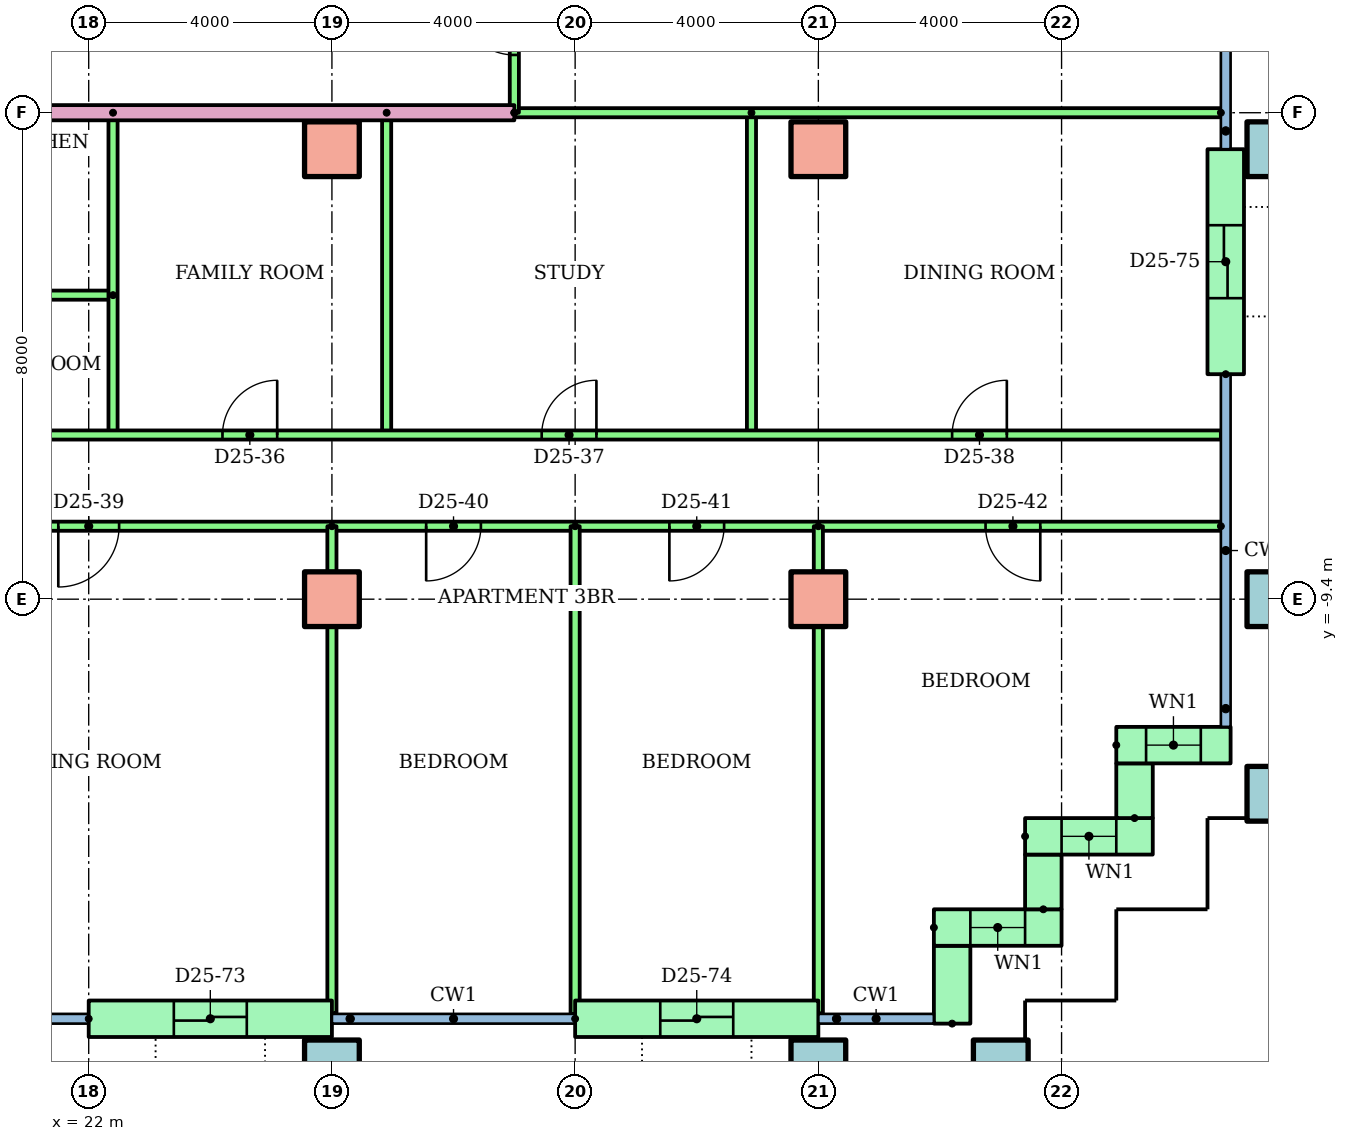
"""IFC4 building model, lengths in metres.
Left out: names, types, materials, properties, quantities, classifications, styles, units other than length and angle.
Written with IfcOpenShell. Run it as: python <this file> out.ifc"""

import sys

from ifc_helpers import new_model, si_unit, direction, frame, frame_2d, origin, origin_2d, place, context, subcontext, project, spatial, rectangle, hollow_rectangle, extrude, element, fill, save


model = new_model("IFC4")
c1 = context("Model", 3, precision=1e-05, world=origin(), true_north=direction((0.0, 1.0)))
c2 = subcontext(c1, "Body", "Model", "MODEL_VIEW")
j1 = project(units=[si_unit("LENGTHUNIT", "METRE"), si_unit("PLANEANGLEUNIT", "RADIAN")], contexts=[c1])
p1 = place(None, origin())
s1 = spatial("IfcSite", under=j1, at=p1, CompositionType="ELEMENT")
p2 = place(p1, origin())
s2 = spatial("IfcBuilding", under=s1, at=p2, CompositionType="ELEMENT")
p3 = place(p2, frame((0.0, 0.0, 96.7)))
s3 = spatial("IfcBuildingStorey", under=s2, at=p3, CompositionType="ELEMENT", Elevation=96.7)
for number, where in (
    (1, (26.0, -17.1, 0.0)),
    (2, (34.0, -17.1, 0.0)),
    (3, (37.0, -17.1, 0.0)),
    (4, (41.5, -12.6, 0.0)),
):
    element("IfcColumn", number, at=place(p3, frame(where)), inside=s3, PredefinedType="COLUMN", context=c2, shape_type="SweptSolid", body=[
        extrude(hollow_rectangle(XDim=0.9, YDim=0.9, WallThickness=0.045, at=origin_2d()), origin(), (0.0, 0.0, 1.0), 3.2),
    ])
for number, where in (
    (5, (26.0, -9.4, 0.0)),
    (6, (34.0, -9.4, 0.0)),
):
    element("IfcColumn", number, at=place(p3, frame(where)), inside=s3, PredefinedType="COLUMN", context=c2, shape_type="SweptSolid", body=[
        extrude(rectangle(XDim=0.9, YDim=0.9, at=origin_2d()), origin(), (0.0, 0.0, 1.0), 3.2),
    ])
p4 = place(p3, frame((41.5, -9.4, 0.0)))
e7 = element("IfcColumn", 7, at=p4, inside=s3, PredefinedType="COLUMN", context=c2, shape_type="SweptSolid", body=[
    extrude(hollow_rectangle(XDim=0.9, YDim=0.9, WallThickness=0.045, at=origin_2d()), origin(), (0.0, 0.0, 1.0), 3.2),
])
for number, where in (
    (8, (26.0, -2.0, 0.0)),
    (9, (34.0, -2.0, 0.0)),
):
    element("IfcColumn", number, at=place(p3, frame(where)), inside=s3, PredefinedType="COLUMN", context=c2, shape_type="SweptSolid", body=[
        extrude(rectangle(XDim=0.9, YDim=0.9, at=origin_2d()), origin(), (0.0, 0.0, 1.0), 3.2),
    ])
p5 = place(p3, frame((41.5, -2.0, 0.0)))
e10 = element("IfcColumn", 10, at=p5, inside=s3, PredefinedType="COLUMN", context=c2, shape_type="SweptSolid", body=[
    extrude(hollow_rectangle(XDim=0.9, YDim=0.9, WallThickness=0.045, at=origin_2d()), origin(), (0.0, 0.0, 1.0), 3.2),
])
p6 = place(p3, frame((22.0, -16.3, 0.0)))
e11 = element("IfcWall", 11, at=p6, inside=s3, PredefinedType="STANDARD", context=c2, shape_type="SweptSolid", body=[
    extrude(rectangle(XDim=4.0, YDim=0.6, at=frame_2d((2.0, 0.0))), origin(), (0.0, 0.0, 1.0), 2.92),
])
p7 = place(p6, frame((1.4, 0.0, 0.0)))
e12 = element("IfcOpeningElement", 12, at=p7, cuts=e11, PredefinedType="OPENING", context=c2, shape_type="SweptSolid", body=[
    extrude(rectangle(XDim=1.2, YDim=2.1, at=frame_2d((0.6, 1.05))), frame((0.0, 0.31, 0.0), z_axis=(0.0, -1.0, 0.0), x_axis=(1.0, 0.0, 0.0)), (0.0, 0.0, 1.0), 0.62),
])
p8 = place(p3, frame((30.0, -16.3, 0.0)))
e13 = element("IfcWall", 13, at=p8, inside=s3, PredefinedType="STANDARD", context=c2, shape_type="SweptSolid", body=[
    extrude(rectangle(XDim=4.0, YDim=0.6, at=frame_2d((2.0, 0.0))), origin(), (0.0, 0.0, 1.0), 2.92),
])
p9 = place(p8, frame((1.4, 0.0, 0.0)))
e14 = element("IfcOpeningElement", 14, at=p9, cuts=e13, PredefinedType="OPENING", context=c2, shape_type="SweptSolid", body=[
    extrude(rectangle(XDim=1.2, YDim=2.1, at=frame_2d((0.6, 1.05))), frame((0.0, 0.31, 0.0), z_axis=(0.0, -1.0, 0.0), x_axis=(1.0, 0.0, 0.0)), (0.0, 0.0, 1.0), 0.62),
])
p10 = place(p3, frame((36.2, -16.38, 0.0), z_axis=(0.0, 0.0, 1.0), x_axis=(0.0, 1.0, 0.0)))
e15 = element("IfcWall", 15, at=p10, inside=s3, PredefinedType="STANDARD", context=c2, shape_type="SweptSolid", body=[
    extrude(rectangle(XDim=1.28, YDim=0.6, at=frame_2d((0.64, 0.0))), origin(), (0.0, 0.0, 1.0), 2.92),
])
p11 = place(p3, frame((35.9, -14.8, 0.0)))
e16 = element("IfcWall", 16, at=p11, inside=s3, PredefinedType="STANDARD", context=c2, shape_type="SweptSolid", body=[
    extrude(rectangle(XDim=2.1, YDim=0.6, at=frame_2d((1.05, 0.0))), origin(), (0.0, 0.0, 1.0), 2.92),
])
p12 = place(p11, frame((0.6, 0.0, 0.9)))
e17 = element("IfcOpeningElement", 17, at=p12, cuts=e16, PredefinedType="OPENING", context=c2, shape_type="SweptSolid", body=[
    extrude(rectangle(XDim=0.9, YDim=1.5, at=frame_2d((0.45, 0.75))), frame((0.0, 0.31, 0.0), z_axis=(0.0, -1.0, 0.0), x_axis=(1.0, 0.0, 0.0)), (0.0, 0.0, 1.0), 0.62),
])
p13 = place(p3, frame((37.7, -14.5, 0.0), z_axis=(0.0, 0.0, 1.0), x_axis=(0.0, 1.0, 0.0)))
e18 = element("IfcWall", 18, at=p13, inside=s3, PredefinedType="STANDARD", context=c2, shape_type="SweptSolid", body=[
    extrude(rectangle(XDim=0.9, YDim=0.6, at=frame_2d((0.45, 0.0))), origin(), (0.0, 0.0, 1.0), 2.92),
])
p14 = place(p3, frame((37.4, -13.3, 0.0)))
e19 = element("IfcWall", 19, at=p14, inside=s3, PredefinedType="STANDARD", context=c2, shape_type="SweptSolid", body=[
    extrude(rectangle(XDim=2.1, YDim=0.6, at=frame_2d((1.05, 0.0))), origin(), (0.0, 0.0, 1.0), 2.92),
])
p15 = place(p14, frame((0.6, 0.0, 0.9)))
e20 = element("IfcOpeningElement", 20, at=p15, cuts=e19, PredefinedType="OPENING", context=c2, shape_type="SweptSolid", body=[
    extrude(rectangle(XDim=0.9, YDim=1.5, at=frame_2d((0.45, 0.75))), frame((0.0, 0.31, 0.0), z_axis=(0.0, -1.0, 0.0), x_axis=(1.0, 0.0, 0.0)), (0.0, 0.0, 1.0), 0.62),
])
p16 = place(p3, frame((39.2, -13.0, 0.0), z_axis=(0.0, 0.0, 1.0), x_axis=(0.0, 1.0, 0.0)))
e21 = element("IfcWall", 21, at=p16, inside=s3, PredefinedType="STANDARD", context=c2, shape_type="SweptSolid", body=[
    extrude(rectangle(XDim=0.9, YDim=0.6, at=frame_2d((0.45, 0.0))), origin(), (0.0, 0.0, 1.0), 2.92),
])
p17 = place(p3, frame((38.9, -11.8, 0.0)))
e22 = element("IfcWall", 22, at=p17, inside=s3, PredefinedType="STANDARD", context=c2, shape_type="SweptSolid", body=[
    extrude(rectangle(XDim=1.88, YDim=0.6, at=frame_2d((0.94, 0.0))), origin(), (0.0, 0.0, 1.0), 2.92),
])
p18 = place(p17, frame((0.49, 0.0, 0.9)))
e23 = element("IfcOpeningElement", 23, at=p18, cuts=e22, PredefinedType="OPENING", context=c2, shape_type="SweptSolid", body=[
    extrude(rectangle(XDim=0.9, YDim=1.5, at=frame_2d((0.45, 0.75))), frame((0.0, 0.31, 0.0), z_axis=(0.0, -1.0, 0.0), x_axis=(1.0, 0.0, 0.0)), (0.0, 0.0, 1.0), 0.62),
])
p19 = place(p3, frame((40.7, -5.7, 0.0), z_axis=(0.0, 0.0, 1.0), x_axis=(0.0, 1.0, 0.0)))
e24 = element("IfcWall", 24, at=p19, inside=s3, PredefinedType="STANDARD", context=c2, shape_type="SweptSolid", body=[
    extrude(rectangle(XDim=3.7, YDim=0.6, at=frame_2d((1.85, 0.0))), origin(), (0.0, 0.0, 1.0), 2.92),
])
p20 = place(p19, frame((1.25, 0.0, 0.0)))
e25 = element("IfcOpeningElement", 25, at=p20, cuts=e24, PredefinedType="OPENING", context=c2, shape_type="SweptSolid", body=[
    extrude(rectangle(XDim=1.2, YDim=2.1, at=frame_2d((0.6, 1.05))), frame((0.0, 0.31, 0.0), z_axis=(0.0, -1.0, 0.0), x_axis=(1.0, 0.0, 0.0)), (0.0, 0.0, 1.0), 0.62),
])
p21 = place(p3, frame((22.4, -4.4, 0.0), z_axis=(0.0, 0.0, 1.0), x_axis=(-1.0, 0.0, 0.0)))
e26 = element("IfcWall", 26, at=p21, inside=s3, PredefinedType="PARTITIONING", context=c2, shape_type="SweptSolid", body=[
    extrude(rectangle(XDim=2.4, YDim=0.15, at=frame_2d((1.2, 0.0))), origin(), (0.0, 0.0, 1.0), 2.4),
])
for number, where, z_axis, x_axis in (
    (27, (22.4, -1.4, 0.0), (0.0, 0.0, 1.0), (0.0, -1.0, 0.0)),
    (28, (26.9, -1.4, 0.0), (0.0, 0.0, 1.0), (0.0, -1.0, 0.0)),
    (29, (32.9, -1.4, 0.0), (0.0, 0.0, 1.0), (0.0, -1.0, 0.0)),
):
    element("IfcWall", number, at=place(p3, frame(where, z_axis=z_axis, x_axis=x_axis)), inside=s3, PredefinedType="PARTITIONING", context=c2, shape_type="SweptSolid", body=[
        extrude(rectangle(XDim=5.3, YDim=0.15, at=frame_2d((2.65, 0.0))), origin(), (0.0, 0.0, 1.0), 2.4),
    ])
p22 = place(p3, frame((20.0, -6.7, 0.0)))
e30 = element("IfcWall", 30, at=p22, inside=s3, PredefinedType="PARTITIONING", context=c2, shape_type="SweptSolid", body=[
    extrude(rectangle(XDim=20.62, YDim=0.15, at=frame_2d((10.31, 0.0))), origin(), (0.0, 0.0, 1.0), 2.4),
])
p23 = place(p22, frame((4.2, 0.0, 0.0)))
e31 = element("IfcOpeningElement", 31, at=p23, cuts=e30, PredefinedType="OPENING", context=c2, shape_type="SweptSolid", body=[
    extrude(rectangle(XDim=0.9, YDim=2.1, at=frame_2d((0.45, 1.05))), frame((0.0, 0.085, 0.0), z_axis=(0.0, -1.0, 0.0), x_axis=(1.0, 0.0, 0.0)), (0.0, 0.0, 1.0), 0.17),
])
p24 = place(p22, frame((9.45, 0.0, 0.0)))
e32 = element("IfcOpeningElement", 32, at=p24, cuts=e30, PredefinedType="OPENING", context=c2, shape_type="SweptSolid", body=[
    extrude(rectangle(XDim=0.9, YDim=2.1, at=frame_2d((0.45, 1.05))), frame((0.0, 0.085, 0.0), z_axis=(0.0, -1.0, 0.0), x_axis=(1.0, 0.0, 0.0)), (0.0, 0.0, 1.0), 0.17),
])
p25 = place(p22, frame((16.2, 0.0, 0.0)))
e33 = element("IfcOpeningElement", 33, at=p25, cuts=e30, PredefinedType="OPENING", context=c2, shape_type="SweptSolid", body=[
    extrude(rectangle(XDim=0.9, YDim=2.1, at=frame_2d((0.45, 1.05))), frame((0.0, 0.085, 0.0), z_axis=(0.0, -1.0, 0.0), x_axis=(1.0, 0.0, 0.0)), (0.0, 0.0, 1.0), 0.17),
])
p26 = place(p3, frame((40.62, -8.2, 0.0), z_axis=(0.0, 0.0, 1.0), x_axis=(-1.0, 0.0, 0.0)))
e34 = element("IfcWall", 34, at=p26, inside=s3, PredefinedType="PARTITIONING", context=c2, shape_type="SweptSolid", body=[
    extrude(rectangle(XDim=22.62, YDim=0.15, at=frame_2d((11.31, 0.0))), origin(), (0.0, 0.0, 1.0), 2.4),
])
p27 = place(p26, frame((18.12, 0.0, 0.0)))
e35 = element("IfcOpeningElement", 35, at=p27, cuts=e34, PredefinedType="OPENING", context=c2, shape_type="SweptSolid", body=[
    extrude(rectangle(XDim=1.0, YDim=2.1, at=frame_2d((0.5, 1.05))), frame((0.0, 0.085, 0.0), z_axis=(0.0, -1.0, 0.0), x_axis=(1.0, 0.0, 0.0)), (0.0, 0.0, 1.0), 0.17),
])
p28 = place(p26, frame((12.17, 0.0, 0.0)))
e36 = element("IfcOpeningElement", 36, at=p28, cuts=e34, PredefinedType="OPENING", context=c2, shape_type="SweptSolid", body=[
    extrude(rectangle(XDim=0.9, YDim=2.1, at=frame_2d((0.45, 1.05))), frame((0.0, 0.085, 0.0), z_axis=(0.0, -1.0, 0.0), x_axis=(1.0, 0.0, 0.0)), (0.0, 0.0, 1.0), 0.17),
])
p29 = place(p26, frame((8.17, 0.0, 0.0)))
e37 = element("IfcOpeningElement", 37, at=p29, cuts=e34, PredefinedType="OPENING", context=c2, shape_type="SweptSolid", body=[
    extrude(rectangle(XDim=0.9, YDim=2.1, at=frame_2d((0.45, 1.05))), frame((0.0, 0.085, 0.0), z_axis=(0.0, -1.0, 0.0), x_axis=(1.0, 0.0, 0.0)), (0.0, 0.0, 1.0), 0.17),
])
p30 = place(p26, frame((2.97, 0.0, 0.0)))
e38 = element("IfcOpeningElement", 38, at=p30, cuts=e34, PredefinedType="OPENING", context=c2, shape_type="SweptSolid", body=[
    extrude(rectangle(XDim=0.9, YDim=2.1, at=frame_2d((0.45, 1.05))), frame((0.0, 0.085, 0.0), z_axis=(0.0, -1.0, 0.0), x_axis=(1.0, 0.0, 0.0)), (0.0, 0.0, 1.0), 0.17),
])
p31 = place(p3, frame((26.0, -8.2, 0.0), z_axis=(0.0, 0.0, 1.0), x_axis=(0.0, -1.0, 0.0)))
e39 = element("IfcWall", 39, at=p31, inside=s3, PredefinedType="PARTITIONING", context=c2, shape_type="SweptSolid", body=[
    extrude(rectangle(XDim=8.01, YDim=0.15, at=frame_2d((4.005, 0.0))), origin(), (0.0, 0.0, 1.0), 2.4),
])
p32 = place(p3, frame((30.0, -8.2, 0.0), z_axis=(0.0, 0.0, 1.0), x_axis=(0.0, -1.0, 0.0)))
e40 = element("IfcWall", 40, at=p32, inside=s3, PredefinedType="PARTITIONING", context=c2, shape_type="SweptSolid", body=[
    extrude(rectangle(XDim=8.021, YDim=0.15, at=frame_2d((4.01, 0.0))), origin(), (0.0, 0.0, 1.0), 2.4),
])
p33 = place(p3, frame((34.0, -8.2, 0.0), z_axis=(0.0, 0.0, 1.0), x_axis=(0.0, -1.0, 0.0)))
e41 = element("IfcWall", 41, at=p33, inside=s3, PredefinedType="PARTITIONING", context=c2, shape_type="SweptSolid", body=[
    extrude(rectangle(XDim=8.01, YDim=0.15, at=frame_2d((4.005, 0.0))), origin(), (0.0, 0.0, 1.0), 2.4),
])
p34 = place(p3, frame((29.0, -1.4, 0.0), z_axis=(0.0, 0.0, 1.0), x_axis=(-1.0, 0.0, 0.0)))
e42 = element("IfcWall", 42, at=p34, inside=s3, PredefinedType="PARTITIONING", context=c2, shape_type="SweptSolid", body=[
    extrude(rectangle(XDim=15.0, YDim=0.25, at=frame_2d((7.5, 0.0))), origin(), (0.0, 0.0, 1.0), 2.4),
])
p35 = place(p34, frame((9.311, 0.0, 0.0)))
e43 = element("IfcOpeningElement", 43, at=p35, cuts=e42, PredefinedType="OPENING", context=c2, shape_type="SweptSolid", body=[
    extrude(rectangle(XDim=1.0, YDim=2.1, at=frame_2d((0.5, 1.05))), frame((0.0, 0.135, 0.0), z_axis=(0.0, -1.0, 0.0), x_axis=(1.0, 0.0, 0.0)), (0.0, 0.0, 1.0), 0.27),
])
p36 = place(p3, frame((40.62, -1.4, 0.0), z_axis=(0.0, 0.0, 1.0), x_axis=(-1.0, 0.0, 0.0)))
e44 = element("IfcWall", 44, at=p36, inside=s3, PredefinedType="PARTITIONING", context=c2, shape_type="SweptSolid", body=[
    extrude(rectangle(XDim=11.62, YDim=0.15, at=frame_2d((5.81, 0.0))), origin(), (0.0, 0.0, 1.0), 2.4),
])
p37 = place(p3, frame((29.0, -1.4, 0.0), z_axis=(0.0, 0.0, 1.0), x_axis=(0.0, 1.0, 0.0)))
e45 = element("IfcWall", 45, at=p37, inside=s3, PredefinedType="PARTITIONING", context=c2, shape_type="SweptSolid", body=[
    extrude(rectangle(XDim=2.8, YDim=0.15, at=frame_2d((1.4, 0.0))), origin(), (0.0, 0.0, 1.0), 2.4),
])
p38 = place(p37, frame((0.95, 0.0, 0.0)))
e46 = element("IfcOpeningElement", 46, at=p38, cuts=e45, PredefinedType="OPENING", context=c2, shape_type="SweptSolid", body=[
    extrude(rectangle(XDim=0.9, YDim=2.1, at=frame_2d((0.45, 1.05))), frame((0.0, 0.085, 0.0), z_axis=(0.0, -1.0, 0.0), x_axis=(1.0, 0.0, 0.0)), (0.0, 0.0, 1.0), 0.17),
])
p39 = place(p12, origin())
e47 = element("IfcWindow", 47, at=p39, inside=s3, PartitioningType="SINGLE_PANEL", PredefinedType="WINDOW", context=c2, shape_type="SweptSolid", body=[
    extrude(rectangle(XDim=0.9, YDim=1.5, at=frame_2d((0.45, 0.75))), frame((0.0, 0.03, 0.0), z_axis=(0.0, -1.0, 0.0), x_axis=(1.0, 0.0, 0.0)), (0.0, 0.0, 1.0), 0.06),
])
fill(e17, e47)
p40 = place(p15, origin())
e48 = element("IfcWindow", 48, at=p40, inside=s3, PartitioningType="SINGLE_PANEL", PredefinedType="WINDOW", context=c2, shape_type="SweptSolid", body=[
    extrude(rectangle(XDim=0.9, YDim=1.5, at=frame_2d((0.45, 0.75))), frame((0.0, 0.03, 0.0), z_axis=(0.0, -1.0, 0.0), x_axis=(1.0, 0.0, 0.0)), (0.0, 0.0, 1.0), 0.06),
])
fill(e20, e48)
p41 = place(p18, origin())
e49 = element("IfcWindow", 49, at=p41, inside=s3, PartitioningType="SINGLE_PANEL", PredefinedType="WINDOW", context=c2, shape_type="SweptSolid", body=[
    extrude(rectangle(XDim=0.9, YDim=1.5, at=frame_2d((0.45, 0.75))), frame((0.0, 0.03, 0.0), z_axis=(0.0, -1.0, 0.0), x_axis=(1.0, 0.0, 0.0)), (0.0, 0.0, 1.0), 0.06),
])
fill(e23, e49)
p42 = place(p23, origin())
e50 = element("IfcDoor", 50, at=p42, inside=s3, OperationType="SINGLE_SWING_RIGHT", PredefinedType="DOOR", context=c2, shape_type="SweptSolid", body=[
    extrude(rectangle(XDim=0.9, YDim=2.1, at=frame_2d((0.45, 1.05))), frame((0.0, 0.025, 0.0), z_axis=(0.0, -1.0, 0.0), x_axis=(1.0, 0.0, 0.0)), (0.0, 0.0, 1.0), 0.05),
])
fill(e31, e50)
p43 = place(p24, origin())
e51 = element("IfcDoor", 51, at=p43, inside=s3, OperationType="SINGLE_SWING_RIGHT", PredefinedType="DOOR", context=c2, shape_type="SweptSolid", body=[
    extrude(rectangle(XDim=0.9, YDim=2.1, at=frame_2d((0.45, 1.05))), frame((0.0, 0.025, 0.0), z_axis=(0.0, -1.0, 0.0), x_axis=(1.0, 0.0, 0.0)), (0.0, 0.0, 1.0), 0.05),
])
fill(e32, e51)
p44 = place(p25, origin())
e52 = element("IfcDoor", 52, at=p44, inside=s3, OperationType="SINGLE_SWING_RIGHT", PredefinedType="DOOR", context=c2, shape_type="SweptSolid", body=[
    extrude(rectangle(XDim=0.9, YDim=2.1, at=frame_2d((0.45, 1.05))), frame((0.0, 0.025, 0.0), z_axis=(0.0, -1.0, 0.0), x_axis=(1.0, 0.0, 0.0)), (0.0, 0.0, 1.0), 0.05),
])
fill(e33, e52)
p45 = place(p27, origin())
e53 = element("IfcDoor", 53, at=p45, inside=s3, OperationType="SINGLE_SWING_RIGHT", PredefinedType="DOOR", context=c2, shape_type="SweptSolid", body=[
    extrude(rectangle(XDim=1.0, YDim=2.1, at=frame_2d((0.5, 1.05))), frame((0.0, 0.025, 0.0), z_axis=(0.0, -1.0, 0.0), x_axis=(1.0, 0.0, 0.0)), (0.0, 0.0, 1.0), 0.05),
])
fill(e35, e53)
p46 = place(p28, origin())
e54 = element("IfcDoor", 54, at=p46, inside=s3, OperationType="SINGLE_SWING_RIGHT", PredefinedType="DOOR", context=c2, shape_type="SweptSolid", body=[
    extrude(rectangle(XDim=0.9, YDim=2.1, at=frame_2d((0.45, 1.05))), frame((0.0, 0.025, 0.0), z_axis=(0.0, -1.0, 0.0), x_axis=(1.0, 0.0, 0.0)), (0.0, 0.0, 1.0), 0.05),
])
fill(e36, e54)
p47 = place(p29, origin())
e55 = element("IfcDoor", 55, at=p47, inside=s3, OperationType="SINGLE_SWING_RIGHT", PredefinedType="DOOR", context=c2, shape_type="SweptSolid", body=[
    extrude(rectangle(XDim=0.9, YDim=2.1, at=frame_2d((0.45, 1.05))), frame((0.0, 0.025, 0.0), z_axis=(0.0, -1.0, 0.0), x_axis=(1.0, 0.0, 0.0)), (0.0, 0.0, 1.0), 0.05),
])
fill(e37, e55)
p48 = place(p30, origin())
e56 = element("IfcDoor", 56, at=p48, inside=s3, OperationType="SINGLE_SWING_LEFT", PredefinedType="DOOR", context=c2, shape_type="SweptSolid", body=[
    extrude(rectangle(XDim=0.9, YDim=2.1, at=frame_2d((0.45, 1.05))), frame((0.0, 0.025, 0.0), z_axis=(0.0, -1.0, 0.0), x_axis=(1.0, 0.0, 0.0)), (0.0, 0.0, 1.0), 0.05),
])
fill(e38, e56)
p49 = place(p38, origin())
e57 = element("IfcDoor", 57, at=p49, inside=s3, OperationType="SINGLE_SWING_RIGHT", PredefinedType="DOOR", context=c2, shape_type="SweptSolid", body=[
    extrude(rectangle(XDim=0.9, YDim=2.1, at=frame_2d((0.45, 1.05))), frame((0.0, 0.025, 0.0), z_axis=(0.0, -1.0, 0.0), x_axis=(1.0, 0.0, 0.0)), (0.0, 0.0, 1.0), 0.05),
])
fill(e46, e57)
p50 = place(p7, origin())
e58 = element("IfcDoor", 58, at=p50, inside=s3, OperationType="SLIDING_TO_LEFT", PredefinedType="DOOR", context=c2, shape_type="SweptSolid", body=[
    extrude(rectangle(XDim=1.2, YDim=2.1, at=frame_2d((0.6, 1.05))), frame((0.0, 0.025, 0.0), z_axis=(0.0, -1.0, 0.0), x_axis=(1.0, 0.0, 0.0)), (0.0, 0.0, 1.0), 0.05),
])
fill(e12, e58)
p51 = place(p9, origin())
e59 = element("IfcDoor", 59, at=p51, inside=s3, OperationType="SLIDING_TO_LEFT", PredefinedType="DOOR", context=c2, shape_type="SweptSolid", body=[
    extrude(rectangle(XDim=1.2, YDim=2.1, at=frame_2d((0.6, 1.05))), frame((0.0, 0.025, 0.0), z_axis=(0.0, -1.0, 0.0), x_axis=(1.0, 0.0, 0.0)), (0.0, 0.0, 1.0), 0.05),
])
fill(e14, e59)
p52 = place(p20, origin())
e60 = element("IfcDoor", 60, at=p52, inside=s3, OperationType="SLIDING_TO_LEFT", PredefinedType="DOOR", context=c2, shape_type="SweptSolid", body=[
    extrude(rectangle(XDim=1.2, YDim=2.1, at=frame_2d((0.6, 1.05))), frame((0.0, 0.025, 0.0), z_axis=(0.0, -1.0, 0.0), x_axis=(1.0, 0.0, 0.0)), (0.0, 0.0, 1.0), 0.05),
])
fill(e25, e60)
save(model, sys.argv[1])
